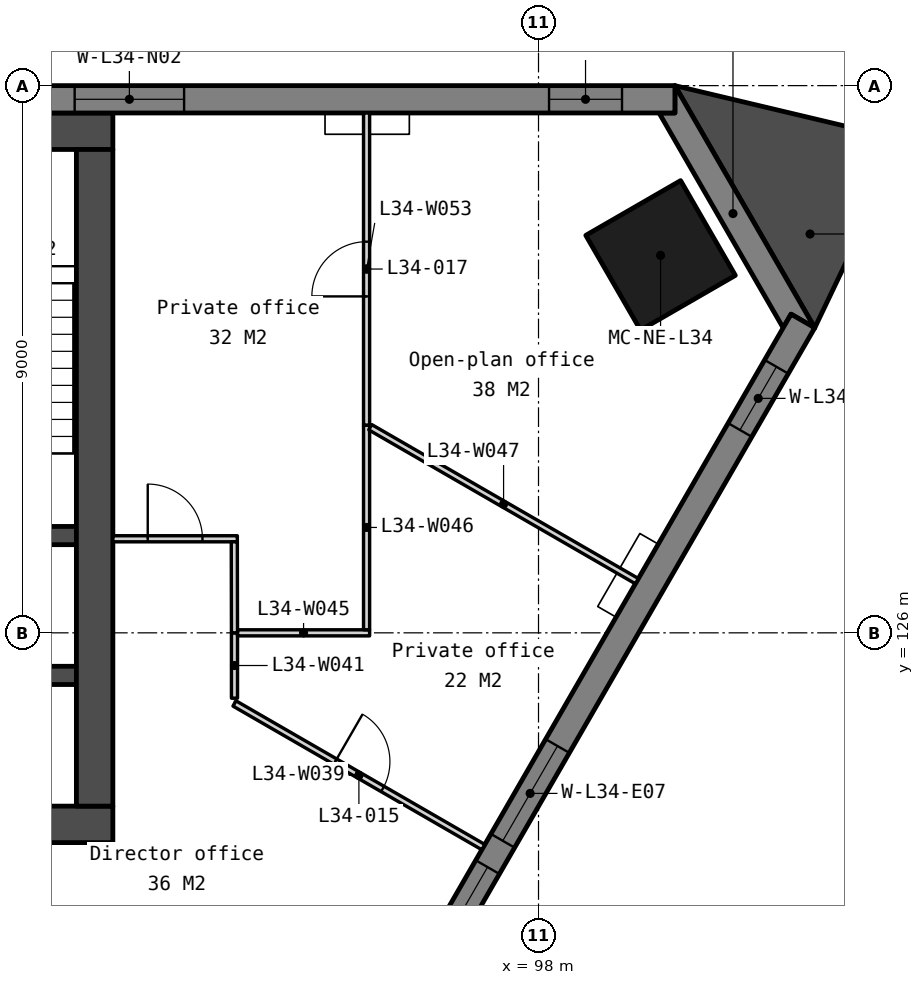
"""IFC4 building model, lengths in metres.
Left out: names, types, materials, properties, quantities, classifications, styles, units other than length and angle.
Written with IfcOpenShell. Run it as: python <this file> out.ifc"""

import sys

from ifc_helpers import new_model, si_unit, direction, frame, frame_2d, origin, origin_2d, place, context, subcontext, project, spatial, polyline, rectangle, outline, extrude, element, fill, save


model = new_model("IFC4")
c1 = context("Model", 3, precision=1e-05, world=origin(), true_north=direction((0.0, 1.0)))
c2 = subcontext(c1, "Body", "Model", "MODEL_VIEW")
j1 = project(units=[si_unit("LENGTHUNIT", "METRE"), si_unit("PLANEANGLEUNIT", "RADIAN")], contexts=[c1])
p1 = place(None, origin())
s1 = spatial("IfcSite", under=j1, at=p1, CompositionType="ELEMENT")
p2 = place(p1, origin())
s2 = spatial("IfcBuilding", under=s1, at=p2, CompositionType="ELEMENT")
p3 = place(p2, frame((0.0, 0.0, 136.4)))
s3 = spatial("IfcBuildingStorey", under=s2, at=p3, CompositionType="ELEMENT", Elevation=136.4)
p4 = place(p3, frame((100.007, 132.208, 0.0), z_axis=(0.0, 0.0, 1.0), x_axis=(-0.5, 0.866025403784, 0.0)))
e1 = element("IfcColumn", 1, at=p4, inside=s3, PredefinedType="COLUMN", context=c2, shape_type="SweptSolid", body=[
    extrude(rectangle(XDim=1.8, YDim=1.8, at=origin_2d()), origin(), (0.0, 0.0, 1.0), 3.9),
])
p5 = place(p3, frame((69.0, 134.25, 0.0), z_axis=(0.0, 0.0, 1.0), x_axis=(1.0, 0.0, 0.0)))
e2 = element("IfcWall", 2, at=p5, inside=s3, PredefinedType="SOLIDWALL", context=c2, shape_type="SweptSolid", body=[
    extrude(rectangle(XDim=22.0, YDim=0.6, at=frame_2d((11.0, 0.0))), origin(), (0.0, 0.0, 1.0), 3.75),
])
p6 = place(p3, frame((69.0, 122.85, 0.0), z_axis=(0.0, 0.0, 1.0), x_axis=(1.0, 0.0, 0.0)))
e3 = element("IfcWall", 3, at=p6, inside=s3, PredefinedType="SOLIDWALL", context=c2, shape_type="SweptSolid", body=[
    extrude(rectangle(XDim=22.0, YDim=0.6, at=frame_2d((11.0, 0.0))), origin(), (0.0, 0.0, 1.0), 3.75),
])
p7 = place(p6, frame((16.375, 0.0, 0.0)))
e4 = element("IfcOpeningElement", 4, at=p7, cuts=e3, PredefinedType="OPENING", context=c2, shape_type="SweptSolid", body=[
    extrude(rectangle(XDim=1.8, YDim=2.1, at=frame_2d((0.9, 1.05))), frame((0.0, 0.31, 0.0), z_axis=(0.0, -1.0, 0.0), x_axis=(1.0, 0.0, 0.0)), (0.0, 0.0, 1.0), 0.62),
])
p8 = place(p6, frame((3.825, 0.0, 0.0)))
e5 = element("IfcOpeningElement", 5, at=p8, cuts=e3, PredefinedType="OPENING", context=c2, shape_type="SweptSolid", body=[
    extrude(rectangle(XDim=1.8, YDim=2.1, at=frame_2d((0.9, 1.05))), frame((0.0, 0.31, 0.0), z_axis=(0.0, -1.0, 0.0), x_axis=(1.0, 0.0, 0.0)), (0.0, 0.0, 1.0), 0.62),
])
p9 = place(p6, frame((12.85, 0.0, 0.0)))
e6 = element("IfcOpeningElement", 6, at=p9, cuts=e3, PredefinedType="OPENING", context=c2, shape_type="SweptSolid", body=[
    extrude(rectangle(XDim=1.5, YDim=2.1, at=frame_2d((0.75, 1.05))), frame((0.0, 0.31, 0.0), z_axis=(0.0, -1.0, 0.0), x_axis=(1.0, 0.0, 0.0)), (0.0, 0.0, 1.0), 0.62),
])
for number, where, z_axis, x_axis in (
    (7, (87.85, 127.6, 0.0), (0.0, 0.0, 1.0), (1.0, 0.0, 0.0)),
    (8, (87.85, 125.3, 0.0), (0.0, 0.0, 1.0), (1.0, 0.0, 0.0)),
):
    element("IfcWall", number, at=place(p3, frame(where, z_axis=z_axis, x_axis=x_axis)), inside=s3, PredefinedType="SOLIDWALL", context=c2, shape_type="SweptSolid", body=[
        extrude(rectangle(XDim=2.55, YDim=0.3, at=frame_2d((1.275, 0.0))), origin(), (0.0, 0.0, 1.0), 3.75),
    ])
p10 = place(p3, frame((90.7, 133.95, 0.0), z_axis=(0.0, 0.0, 1.0), x_axis=(0.0, -1.0, 0.0)))
e9 = element("IfcWall", 9, at=p10, inside=s3, PredefinedType="SOLIDWALL", context=c2, shape_type="SweptSolid", body=[
    extrude(rectangle(XDim=10.8, YDim=0.6, at=frame_2d((5.4, 0.0))), origin(), (0.0, 0.0, 1.0), 3.75),
])
p11 = place(p3, frame((0.0, 0.0, -0.15)))
e10 = element("IfcWall", 10, at=p11, inside=s3, PredefinedType="SOLIDWALL", context=c2, shape_type="SweptSolid", body=[
    extrude(outline(polyline([(102.543, 131.016), (102.153, 131.241), (102.023, 131.016), (99.983, 134.55), (100.243, 134.55), (100.243, 135.0), (102.543, 131.016)])), origin(), (0.0, 0.0, 1.0), 3.9),
])
p12 = place(p3, frame((100.243, 134.775, -0.15), z_axis=(0.0, 0.0, 1.0), x_axis=(-1.0, 0.0, 0.0)))
e11 = element("IfcWall", 11, at=p12, inside=s3, PredefinedType="SOLIDWALL", context=c2, shape_type="SweptSolid", body=[
    extrude(outline(polyline([(40.486, 0.0), (40.486, 3.9), (0.0, 3.9), (0.0, 0.0), (40.486, 0.0)])), frame((0.0, 0.225, 0.0), z_axis=(0.0, -1.0, 0.0), x_axis=(1.0, 0.0, 0.0)), (0.0, 0.0, 1.0), 0.45),
])
p13 = place(p12, frame((0.87, 0.0, 0.95)))
e12 = element("IfcOpeningElement", 12, at=p13, cuts=e11, PredefinedType="OPENING", context=c2, shape_type="SweptSolid", body=[
    extrude(rectangle(XDim=1.2, YDim=2.2, at=frame_2d((0.6, 1.1))), frame((0.0, 0.235, 0.0), z_axis=(0.0, -1.0, 0.0), x_axis=(1.0, 0.0, 0.0)), (0.0, 0.0, 1.0), 0.47),
])
p14 = place(p12, frame((8.072, 0.0, 0.95)))
e13 = element("IfcOpeningElement", 13, at=p14, cuts=e11, PredefinedType="OPENING", context=c2, shape_type="SweptSolid", body=[
    extrude(rectangle(XDim=1.8, YDim=2.2, at=frame_2d((0.9, 1.1))), frame((0.0, 0.235, 0.0), z_axis=(0.0, -1.0, 0.0), x_axis=(1.0, 0.0, 0.0)), (0.0, 0.0, 1.0), 0.47),
])
p15 = place(p12, frame((10.372, 0.0, 0.95)))
e14 = element("IfcOpeningElement", 14, at=p15, cuts=e11, PredefinedType="OPENING", context=c2, shape_type="SweptSolid", body=[
    extrude(rectangle(XDim=1.8, YDim=2.2, at=frame_2d((0.9, 1.1))), frame((0.0, 0.235, 0.0), z_axis=(0.0, -1.0, 0.0), x_axis=(1.0, 0.0, 0.0)), (0.0, 0.0, 1.0), 0.47),
])
p16 = place(p12, frame((18.193, 0.0, 0.95)))
e15 = element("IfcOpeningElement", 15, at=p16, cuts=e11, PredefinedType="OPENING", context=c2, shape_type="SweptSolid", body=[
    extrude(rectangle(XDim=1.8, YDim=2.2, at=frame_2d((0.9, 1.1))), frame((0.0, 0.235, 0.0), z_axis=(0.0, -1.0, 0.0), x_axis=(1.0, 0.0, 0.0)), (0.0, 0.0, 1.0), 0.47),
])
p17 = place(p12, frame((20.493, 0.0, 0.95)))
e16 = element("IfcOpeningElement", 16, at=p17, cuts=e11, PredefinedType="OPENING", context=c2, shape_type="SweptSolid", body=[
    extrude(rectangle(XDim=1.8, YDim=2.2, at=frame_2d((0.9, 1.1))), frame((0.0, 0.235, 0.0), z_axis=(0.0, -1.0, 0.0), x_axis=(1.0, 0.0, 0.0)), (0.0, 0.0, 1.0), 0.47),
])
p18 = place(p12, frame((28.315, 0.0, 0.95)))
e17 = element("IfcOpeningElement", 17, at=p18, cuts=e11, PredefinedType="OPENING", context=c2, shape_type="SweptSolid", body=[
    extrude(rectangle(XDim=1.8, YDim=2.2, at=frame_2d((0.9, 1.1))), frame((0.0, 0.235, 0.0), z_axis=(0.0, -1.0, 0.0), x_axis=(1.0, 0.0, 0.0)), (0.0, 0.0, 1.0), 0.47),
])
p19 = place(p12, frame((30.615, 0.0, 0.95)))
e18 = element("IfcOpeningElement", 18, at=p19, cuts=e11, PredefinedType="OPENING", context=c2, shape_type="SweptSolid", body=[
    extrude(rectangle(XDim=1.8, YDim=2.2, at=frame_2d((0.9, 1.1))), frame((0.0, 0.235, 0.0), z_axis=(0.0, -1.0, 0.0), x_axis=(1.0, 0.0, 0.0)), (0.0, 0.0, 1.0), 0.47),
])
p20 = place(p12, frame((38.417, 0.0, 0.95)))
e19 = element("IfcOpeningElement", 19, at=p20, cuts=e11, PredefinedType="OPENING", context=c2, shape_type="SweptSolid", body=[
    extrude(rectangle(XDim=1.2, YDim=2.2, at=frame_2d((0.6, 1.1))), frame((0.0, 0.235, 0.0), z_axis=(0.0, -1.0, 0.0), x_axis=(1.0, 0.0, 0.0)), (0.0, 0.0, 1.0), 0.47),
])
p21 = place(p3, frame((82.105, 96.067, -0.15), z_axis=(0.0, 0.0, 1.0), x_axis=(0.499997369791, 0.866026922331, 0.0)))
e20 = element("IfcWall", 20, at=p21, inside=s3, PredefinedType="SOLIDWALL", context=c2, shape_type="SweptSolid", body=[
    extrude(outline(polyline([(40.486, 0.0), (40.486, 3.9), (0.0, 3.9), (0.0, 0.0), (40.486, 0.0)])), frame((0.0, 0.225, 0.0), z_axis=(0.0, -1.0, 0.0), x_axis=(1.0, 0.0, 0.0)), (0.0, 0.0, 1.0), 0.45),
])
p22 = place(p21, frame((0.87, 0.0, 0.95)))
e21 = element("IfcOpeningElement", 21, at=p22, cuts=e20, PredefinedType="OPENING", context=c2, shape_type="SweptSolid", body=[
    extrude(rectangle(XDim=1.2, YDim=2.2, at=frame_2d((0.6, 1.1))), frame((0.0, 0.235, 0.0), z_axis=(0.0, -1.0, 0.0), x_axis=(1.0, 0.0, 0.0)), (0.0, 0.0, 1.0), 0.47),
])
p23 = place(p21, frame((8.072, 0.0, 0.95)))
e22 = element("IfcOpeningElement", 22, at=p23, cuts=e20, PredefinedType="OPENING", context=c2, shape_type="SweptSolid", body=[
    extrude(rectangle(XDim=1.8, YDim=2.2, at=frame_2d((0.9, 1.1))), frame((0.0, 0.235, 0.0), z_axis=(0.0, -1.0, 0.0), x_axis=(1.0, 0.0, 0.0)), (0.0, 0.0, 1.0), 0.47),
])
p24 = place(p21, frame((10.372, 0.0, 0.95)))
e23 = element("IfcOpeningElement", 23, at=p24, cuts=e20, PredefinedType="OPENING", context=c2, shape_type="SweptSolid", body=[
    extrude(rectangle(XDim=1.8, YDim=2.2, at=frame_2d((0.9, 1.1))), frame((0.0, 0.235, 0.0), z_axis=(0.0, -1.0, 0.0), x_axis=(1.0, 0.0, 0.0)), (0.0, 0.0, 1.0), 0.47),
])
p25 = place(p21, frame((18.193, 0.0, 0.95)))
e24 = element("IfcOpeningElement", 24, at=p25, cuts=e20, PredefinedType="OPENING", context=c2, shape_type="SweptSolid", body=[
    extrude(rectangle(XDim=1.8, YDim=2.2, at=frame_2d((0.9, 1.1))), frame((0.0, 0.235, 0.0), z_axis=(0.0, -1.0, 0.0), x_axis=(1.0, 0.0, 0.0)), (0.0, 0.0, 1.0), 0.47),
])
p26 = place(p21, frame((20.493, 0.0, 0.95)))
e25 = element("IfcOpeningElement", 25, at=p26, cuts=e20, PredefinedType="OPENING", context=c2, shape_type="SweptSolid", body=[
    extrude(rectangle(XDim=1.8, YDim=2.2, at=frame_2d((0.9, 1.1))), frame((0.0, 0.235, 0.0), z_axis=(0.0, -1.0, 0.0), x_axis=(1.0, 0.0, 0.0)), (0.0, 0.0, 1.0), 0.47),
])
p27 = place(p21, frame((28.315, 0.0, 0.95)))
e26 = element("IfcOpeningElement", 26, at=p27, cuts=e20, PredefinedType="OPENING", context=c2, shape_type="SweptSolid", body=[
    extrude(rectangle(XDim=1.8, YDim=2.2, at=frame_2d((0.9, 1.1))), frame((0.0, 0.235, 0.0), z_axis=(0.0, -1.0, 0.0), x_axis=(1.0, 0.0, 0.0)), (0.0, 0.0, 1.0), 0.47),
])
p28 = place(p21, frame((30.615, 0.0, 0.95)))
e27 = element("IfcOpeningElement", 27, at=p28, cuts=e20, PredefinedType="OPENING", context=c2, shape_type="SweptSolid", body=[
    extrude(rectangle(XDim=1.8, YDim=2.2, at=frame_2d((0.9, 1.1))), frame((0.0, 0.235, 0.0), z_axis=(0.0, -1.0, 0.0), x_axis=(1.0, 0.0, 0.0)), (0.0, 0.0, 1.0), 0.47),
])
p29 = place(p21, frame((38.417, 0.0, 0.95)))
e28 = element("IfcOpeningElement", 28, at=p29, cuts=e20, PredefinedType="OPENING", context=c2, shape_type="SweptSolid", body=[
    extrude(rectangle(XDim=1.2, YDim=2.2, at=frame_2d((0.6, 1.1))), frame((0.0, 0.235, 0.0), z_axis=(0.0, -1.0, 0.0), x_axis=(1.0, 0.0, 0.0)), (0.0, 0.0, 1.0), 0.47),
])
p30 = place(p3, frame((0.0, 0.0, -0.15)))
e29 = element("IfcWall", 29, at=p30, inside=s3, PredefinedType="SOLIDWALL", context=c2, shape_type="SweptSolid", body=[
    extrude(outline(polyline([(102.543, 131.016), (104.016, 134.103), (100.243, 135.0), (102.543, 131.016)])), origin(), (0.0, 0.0, 1.0), 3.9),
])
p31 = place(p3, frame((87.557, 122.137, 0.0), z_axis=(0.0, 0.0, 1.0), x_axis=(0.866029768103, -0.499992440702, 0.0)))
e30 = element("IfcWall", 30, at=p31, inside=s3, PredefinedType="PARTITIONING", context=c2, shape_type="SweptSolid", body=[
    extrude(rectangle(XDim=8.089, YDim=0.1, at=frame_2d((4.044, 0.0))), origin(), (0.0, 0.0, 1.0), 3.75),
])
p32 = place(p31, frame((3.594, 0.0, 0.0)))
e31 = element("IfcOpeningElement", 31, at=p32, cuts=e30, PredefinedType="OPENING", context=c2, shape_type="SweptSolid", body=[
    extrude(rectangle(XDim=0.9, YDim=2.1, at=frame_2d((0.45, 1.05))), frame((0.0, 0.06, 0.0), z_axis=(0.0, -1.0, 0.0), x_axis=(1.0, 0.0, 0.0)), (0.0, 0.0, 1.0), 0.12),
])
p33 = place(p3, frame((93.0, 124.839, 0.0), z_axis=(0.0, 0.0, 1.0), x_axis=(0.866028145587, -0.499995251029, 0.0)))
e32 = element("IfcWall", 32, at=p33, inside=s3, PredefinedType="PARTITIONING", context=c2, shape_type="SweptSolid", body=[
    extrude(rectangle(XDim=4.726, YDim=0.1, at=frame_2d((2.363, 0.0))), origin(), (0.0, 0.0, 1.0), 3.75),
])
p34 = place(p33, frame((1.913, 0.0, 0.0)))
e33 = element("IfcOpeningElement", 33, at=p34, cuts=e32, PredefinedType="OPENING", context=c2, shape_type="SweptSolid", body=[
    extrude(rectangle(XDim=0.9, YDim=2.1, at=frame_2d((0.45, 1.05))), frame((0.0, 0.06, 0.0), z_axis=(0.0, -1.0, 0.0), x_axis=(1.0, 0.0, 0.0)), (0.0, 0.0, 1.0), 0.12),
])
p35 = place(p3, frame((93.0, 124.925, 0.0), z_axis=(0.0, 0.0, 1.0), x_axis=(0.0, 1.0, 0.0)))
e34 = element("IfcWall", 34, at=p35, inside=s3, PredefinedType="PARTITIONING", context=c2, shape_type="SweptSolid", body=[
    extrude(rectangle(XDim=1.075, YDim=0.1, at=frame_2d((0.537, 0.0))), origin(), (0.0, 0.0, 1.0), 3.75),
])
p36 = place(p3, frame((93.05, 126.0, 0.0), z_axis=(0.0, 0.0, 1.0), x_axis=(1.0, 0.0, 0.0)))
e35 = element("IfcWall", 35, at=p36, inside=s3, PredefinedType="PARTITIONING", context=c2, shape_type="SweptSolid", body=[
    extrude(rectangle(XDim=2.172, YDim=0.1, at=frame_2d((1.086, 0.0))), origin(), (0.0, 0.0, 1.0), 3.75),
])
p37 = place(p3, frame((95.172, 126.05, 0.0), z_axis=(0.0, 0.0, 1.0), x_axis=(0.0, 1.0, 0.0)))
e36 = element("IfcWall", 36, at=p37, inside=s3, PredefinedType="PARTITIONING", context=c2, shape_type="SweptSolid", body=[
    extrude(rectangle(XDim=3.367, YDim=0.1, at=frame_2d((1.683, 0.0))), origin(), (0.0, 0.0, 1.0), 3.75),
])
p38 = place(p3, frame((95.233, 129.382, 0.0), z_axis=(0.0, 0.0, 1.0), x_axis=(0.866041859802, -0.499971496258, 0.0)))
e37 = element("IfcWall", 37, at=p38, inside=s3, PredefinedType="PARTITIONING", context=c2, shape_type="SweptSolid", body=[
    extrude(rectangle(XDim=5.063, YDim=0.1, at=frame_2d((2.532, 0.0))), origin(), (0.0, 0.0, 1.0), 3.75),
])
p39 = place(p3, frame((91.0, 127.547, 0.0), z_axis=(0.0, 0.0, 1.0), x_axis=(1.0, 0.0, 0.0)))
e38 = element("IfcWall", 38, at=p39, inside=s3, PredefinedType="PARTITIONING", context=c2, shape_type="SweptSolid", body=[
    extrude(rectangle(XDim=2.047, YDim=0.1, at=frame_2d((1.023, 0.0))), origin(), (0.0, 0.0, 1.0), 3.75),
])
p40 = place(p39, frame((0.573, 0.0, 0.0)))
e39 = element("IfcOpeningElement", 39, at=p40, cuts=e38, PredefinedType="OPENING", context=c2, shape_type="SweptSolid", body=[
    extrude(rectangle(XDim=0.9, YDim=2.1, at=frame_2d((0.45, 1.05))), frame((0.0, 0.06, 0.0), z_axis=(0.0, -1.0, 0.0), x_axis=(1.0, 0.0, 0.0)), (0.0, 0.0, 1.0), 0.12),
])
p41 = place(p3, frame((93.0, 126.0, 0.0), z_axis=(0.0, 0.0, 1.0), x_axis=(-0.001956943415, 0.999998085184, 0.0)))
e40 = element("IfcWall", 40, at=p41, inside=s3, PredefinedType="PARTITIONING", context=c2, shape_type="SweptSolid", body=[
    extrude(rectangle(XDim=1.497, YDim=0.1, at=frame_2d((0.749, 0.0))), origin(), (0.0, 0.0, 1.0), 3.75),
])
p42 = place(p3, frame((95.172, 129.417, 0.0), z_axis=(0.0, 0.0, 1.0), x_axis=(0.0, 1.0, 0.0)))
e41 = element("IfcWall", 41, at=p42, inside=s3, PredefinedType="PARTITIONING", context=c2, shape_type="SweptSolid", body=[
    extrude(rectangle(XDim=5.133, YDim=0.1, at=frame_2d((2.567, 0.0))), origin(), (0.0, 0.0, 1.0), 3.75),
])
p43 = place(p42, frame((2.117, 0.0, 0.0)))
e42 = element("IfcOpeningElement", 42, at=p43, cuts=e41, PredefinedType="OPENING", context=c2, shape_type="SweptSolid", body=[
    extrude(rectangle(XDim=0.9, YDim=2.1, at=frame_2d((0.45, 1.05))), frame((0.0, 0.06, 0.0), z_axis=(0.0, -1.0, 0.0), x_axis=(1.0, 0.0, 0.0)), (0.0, 0.0, 1.0), 0.12),
])
p44 = place(p13, origin())
e43 = element("IfcWindow", 43, at=p44, inside=s3, PartitioningType="SINGLE_PANEL", PredefinedType="WINDOW", context=c2, shape_type="SweptSolid", body=[
    extrude(rectangle(XDim=1.2, YDim=2.2, at=frame_2d((0.6, 1.1))), frame((0.0, 0.03, 0.0), z_axis=(0.0, -1.0, 0.0), x_axis=(1.0, 0.0, 0.0)), (0.0, 0.0, 1.0), 0.06),
])
fill(e12, e43)
p45 = place(p14, origin())
e44 = element("IfcWindow", 44, at=p45, inside=s3, PartitioningType="SINGLE_PANEL", PredefinedType="WINDOW", context=c2, shape_type="SweptSolid", body=[
    extrude(rectangle(XDim=1.8, YDim=2.2, at=frame_2d((0.9, 1.1))), frame((0.0, 0.03, 0.0), z_axis=(0.0, -1.0, 0.0), x_axis=(1.0, 0.0, 0.0)), (0.0, 0.0, 1.0), 0.06),
])
fill(e13, e44)
p46 = place(p27, origin())
e45 = element("IfcWindow", 45, at=p46, inside=s3, PartitioningType="SINGLE_PANEL", PredefinedType="WINDOW", context=c2, shape_type="SweptSolid", body=[
    extrude(rectangle(XDim=1.8, YDim=2.2, at=frame_2d((0.9, 1.1))), frame((0.0, 0.03, 0.0), z_axis=(0.0, -1.0, 0.0), x_axis=(1.0, 0.0, 0.0)), (0.0, 0.0, 1.0), 0.06),
])
fill(e26, e45)
p47 = place(p28, origin())
e46 = element("IfcWindow", 46, at=p47, inside=s3, PartitioningType="SINGLE_PANEL", PredefinedType="WINDOW", context=c2, shape_type="SweptSolid", body=[
    extrude(rectangle(XDim=1.8, YDim=2.2, at=frame_2d((0.9, 1.1))), frame((0.0, 0.03, 0.0), z_axis=(0.0, -1.0, 0.0), x_axis=(1.0, 0.0, 0.0)), (0.0, 0.0, 1.0), 0.06),
])
fill(e27, e46)
p48 = place(p29, origin())
e47 = element("IfcWindow", 47, at=p48, inside=s3, PartitioningType="SINGLE_PANEL", PredefinedType="WINDOW", context=c2, shape_type="SweptSolid", body=[
    extrude(rectangle(XDim=1.2, YDim=2.2, at=frame_2d((0.6, 1.1))), frame((0.0, 0.03, 0.0), z_axis=(0.0, -1.0, 0.0), x_axis=(1.0, 0.0, 0.0)), (0.0, 0.0, 1.0), 0.06),
])
fill(e28, e47)
p49 = place(p40, origin())
e48 = element("IfcDoor", 48, at=p49, inside=s3, OperationType="SINGLE_SWING_LEFT", PredefinedType="DOOR", context=c2, shape_type="SweptSolid", body=[
    extrude(rectangle(XDim=0.9, YDim=2.1, at=frame_2d((0.45, 1.05))), frame((0.0, 0.025, 0.0), z_axis=(0.0, -1.0, 0.0), x_axis=(1.0, 0.0, 0.0)), (0.0, 0.0, 1.0), 0.05),
])
fill(e39, e48)
p50 = place(p34, origin())
e49 = element("IfcDoor", 49, at=p50, inside=s3, OperationType="SINGLE_SWING_LEFT", PredefinedType="DOOR", context=c2, shape_type="SweptSolid", body=[
    extrude(rectangle(XDim=0.9, YDim=2.1, at=frame_2d((0.45, 1.05))), frame((0.0, 0.025, 0.0), z_axis=(0.0, -1.0, 0.0), x_axis=(1.0, 0.0, 0.0)), (0.0, 0.0, 1.0), 0.05),
])
fill(e33, e49)
p51 = place(p43, origin())
e50 = element("IfcDoor", 50, at=p51, inside=s3, OperationType="SINGLE_SWING_LEFT", PredefinedType="DOOR", context=c2, shape_type="SweptSolid", body=[
    extrude(rectangle(XDim=0.9, YDim=2.1, at=frame_2d((0.45, 1.05))), frame((0.0, 0.025, 0.0), z_axis=(0.0, -1.0, 0.0), x_axis=(1.0, 0.0, 0.0)), (0.0, 0.0, 1.0), 0.05),
])
fill(e42, e50)
save(model, sys.argv[1])
